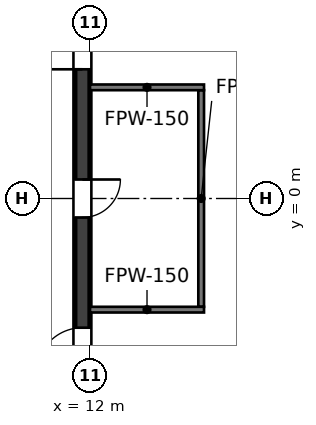
"""IFC4 building model, lengths in metres.
Left out: names, types, materials, properties, quantities, classifications, styles, units other than length and angle.
Written with IfcOpenShell. Run it as: python <this file> out.ifc"""

import sys

from ifc_helpers import new_model, si_unit, direction, frame, frame_2d, origin, place, context, subcontext, project, spatial, rectangle, extrude, element, fill, save


model = new_model("IFC4")
c1 = context("Model", 3, precision=1e-05, world=origin(), true_north=direction((0.0, 1.0)))
c2 = subcontext(c1, "Body", "Model", "MODEL_VIEW")
j1 = project(units=[si_unit("LENGTHUNIT", "METRE"), si_unit("PLANEANGLEUNIT", "RADIAN")], contexts=[c1])
p1 = place(None, origin())
s1 = spatial("IfcSite", under=j1, at=p1, CompositionType="ELEMENT")
p2 = place(p1, origin())
s2 = spatial("IfcBuilding", under=s1, at=p2, CompositionType="ELEMENT")
p3 = place(p2, frame((0.0, 0.0, 241.6)))
s3 = spatial("IfcBuildingStorey", under=s2, at=p3, CompositionType="ELEMENT", Elevation=241.6)
p4 = place(p3, frame((11.8, -5.5, 0.0), z_axis=(0.0, 0.0, 1.0), x_axis=(0.0, 1.0, 0.0)))
e1 = element("IfcWall", 1, at=p4, inside=s3, PredefinedType="SHEAR", context=c2, shape_type="SweptSolid", body=[
    extrude(rectangle(XDim=11.0, YDim=0.4, at=frame_2d((5.5, 0.0))), origin(), (0.0, 0.0, 1.0), 4.0),
])
p5 = place(p4, frame((5.0, 0.0, 0.0)))
e2 = element("IfcOpeningElement", 2, at=p5, cuts=e1, PredefinedType="OPENING", context=c2, shape_type="SweptSolid", body=[
    extrude(rectangle(XDim=1.0, YDim=2.1, at=frame_2d((0.5, 1.05))), frame((0.0, 0.2, 0.0), z_axis=(0.0, -1.0, 0.0), x_axis=(1.0, 0.0, 0.0)), (0.0, 0.0, 1.0), 0.4),
])
p6 = place(p4, frame((0.9, 0.0, 0.0)))
e3 = element("IfcOpeningElement", 3, at=p6, cuts=e1, PredefinedType="OPENING", context=c2, shape_type="SweptSolid", body=[
    extrude(rectangle(XDim=1.2, YDim=2.1, at=frame_2d((0.6, 1.05))), frame((0.0, 0.2, 0.0), z_axis=(0.0, -1.0, 0.0), x_axis=(1.0, 0.0, 0.0)), (0.0, 0.0, 1.0), 0.4),
])
p7 = place(p4, frame((8.9, 0.0, 0.0)))
e4 = element("IfcOpeningElement", 4, at=p7, cuts=e1, PredefinedType="OPENING", context=c2, shape_type="SweptSolid", body=[
    extrude(rectangle(XDim=1.2, YDim=2.1, at=frame_2d((0.6, 1.05))), frame((0.0, 0.2, 0.0), z_axis=(0.0, -1.0, 0.0), x_axis=(1.0, 0.0, 0.0)), (0.0, 0.0, 1.0), 0.4),
])
p8 = place(p3, frame((14.925, -2.85, 0.0), z_axis=(0.0, 0.0, 1.0), x_axis=(0.0, 1.0, 0.0)))
e5 = element("IfcWall", 5, at=p8, inside=s3, PredefinedType="PARTITIONING", context=c2, shape_type="SweptSolid", body=[
    extrude(rectangle(XDim=5.7, YDim=0.15, at=frame_2d((2.85, 0.0))), origin(), (0.0, 0.0, 1.0), 2.768),
])
for number, where, z_axis, x_axis in (
    (6, (12.0, 2.925, 0.0), (0.0, 0.0, 1.0), (1.0, 0.0, 0.0)),
    (7, (12.0, -2.925, 0.0), (0.0, 0.0, 1.0), (1.0, 0.0, 0.0)),
):
    element("IfcWall", number, at=place(p3, frame(where, z_axis=z_axis, x_axis=x_axis)), inside=s3, PredefinedType="PARTITIONING", context=c2, shape_type="SweptSolid", body=[
        extrude(rectangle(XDim=3.0, YDim=0.15, at=frame_2d((1.5, 0.0))), origin(), (0.0, 0.0, 1.0), 2.768),
    ])
p9 = place(p5, origin())
e8 = element("IfcDoor", 8, at=p9, inside=s3, OperationType="SINGLE_SWING_RIGHT", PredefinedType="DOOR", context=c2, shape_type="SweptSolid", body=[
    extrude(rectangle(XDim=1.0, YDim=2.1, at=frame_2d((0.5, 1.05))), frame((0.0, 0.025, 0.0), z_axis=(0.0, -1.0, 0.0), x_axis=(1.0, 0.0, 0.0)), (0.0, 0.0, 1.0), 0.05),
])
fill(e2, e8)
p10 = place(p6, origin())
e9 = element("IfcDoor", 9, at=p10, inside=s3, OperationType="SINGLE_SWING_LEFT", PredefinedType="DOOR", context=c2, shape_type="SweptSolid", body=[
    extrude(rectangle(XDim=1.2, YDim=2.1, at=frame_2d((0.6, 1.05))), frame((0.0, 0.025, 0.0), z_axis=(0.0, -1.0, 0.0), x_axis=(1.0, 0.0, 0.0)), (0.0, 0.0, 1.0), 0.05),
])
fill(e3, e9)
p11 = place(p7, origin())
e10 = element("IfcDoor", 10, at=p11, inside=s3, OperationType="SINGLE_SWING_LEFT", PredefinedType="DOOR", context=c2, shape_type="SweptSolid", body=[
    extrude(rectangle(XDim=1.2, YDim=2.1, at=frame_2d((0.6, 1.05))), frame((0.0, 0.025, 0.0), z_axis=(0.0, -1.0, 0.0), x_axis=(1.0, 0.0, 0.0)), (0.0, 0.0, 1.0), 0.05),
])
fill(e4, e10)
save(model, sys.argv[1])
